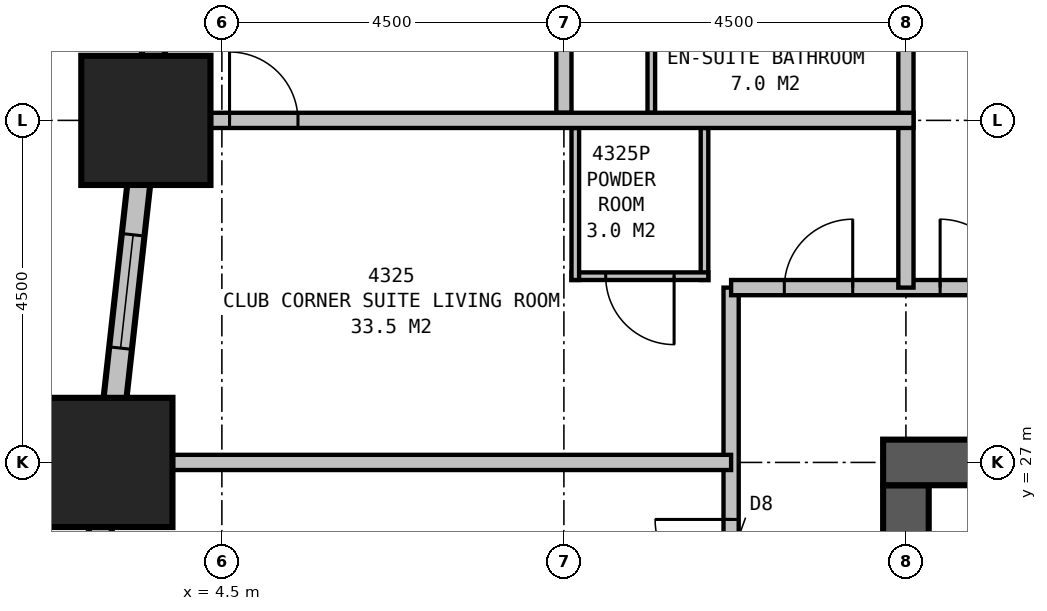
"""IFC4 building model, lengths in metres.
Left out: names, types, materials, properties, quantities, classifications, styles, units other than length and angle.
Written with IfcOpenShell. Run it as: python <this file> out.ifc"""

import sys

from ifc_helpers import new_model, si_unit, direction, frame, frame_2d, origin, origin_2d, place, context, subcontext, project, spatial, rectangle, extrude, element, fill, save


model = new_model("IFC4")
c1 = context("Model", 3, precision=1e-05, world=origin(), true_north=direction((0.0, 1.0)))
c2 = subcontext(c1, "Body", "Model", "MODEL_VIEW")
j1 = project(units=[si_unit("LENGTHUNIT", "METRE"), si_unit("PLANEANGLEUNIT", "RADIAN")], contexts=[c1])
p1 = place(None, origin())
s1 = spatial("IfcSite", under=j1, at=p1, CompositionType="ELEMENT")
p2 = place(p1, origin())
s2 = spatial("IfcBuilding", under=s1, at=p2, CompositionType="ELEMENT")
p3 = place(p2, frame((0.0, 0.0, 169.4)))
s3 = spatial("IfcBuildingStorey", under=s2, at=p3, CompositionType="ELEMENT", Elevation=169.4)
for number, where, z_axis, x_axis in (
    (1, (3.5, 31.5, 0.0), (0.0, 0.0, 1.0), (1.0, 0.0, 0.0)),
    (2, (3.0, 27.0, 0.0), (0.0, 0.0, 1.0), (1.0, 0.0, 0.0)),
):
    element("IfcColumn", number, at=place(p3, frame(where, z_axis=z_axis, x_axis=x_axis)), inside=s3, PredefinedType="COLUMN", context=c2, shape_type="SweptSolid", body=[
        extrude(rectangle(XDim=1.7, YDim=1.7, at=origin_2d()), origin(), (0.0, 0.0, 1.0), 3.5),
    ])
p4 = place(p3, frame((36.3, 27.0, 0.0), z_axis=(0.0, 0.0, 1.0), x_axis=(-1.0, 0.0, 0.0)))
e3 = element("IfcWall", 3, at=p4, inside=s3, PredefinedType="SHEAR", context=c2, shape_type="SweptSolid", body=[
    extrude(rectangle(XDim=23.1, YDim=0.6, at=frame_2d((11.55, 0.0))), origin(), (0.0, 0.0, 1.0), 3.5),
])
p5 = place(p4, frame((17.05, 0.0, 0.0)))
e4 = element("IfcOpeningElement", 4, at=p5, cuts=e3, PredefinedType="OPENING", context=c2, shape_type="SweptSolid", body=[
    extrude(rectangle(XDim=1.0, YDim=2.1, at=frame_2d((0.5, 1.05))), frame((0.0, 0.31, 0.0), z_axis=(0.0, -1.0, 0.0), x_axis=(1.0, 0.0, 0.0)), (0.0, 0.0, 1.0), 0.62),
])
p6 = place(p4, frame((12.05, 0.0, 0.0)))
e5 = element("IfcOpeningElement", 5, at=p6, cuts=e3, PredefinedType="OPENING", context=c2, shape_type="SweptSolid", body=[
    extrude(rectangle(XDim=1.0, YDim=2.1, at=frame_2d((0.5, 1.05))), frame((0.0, 0.31, 0.0), z_axis=(0.0, -1.0, 0.0), x_axis=(1.0, 0.0, 0.0)), (0.0, 0.0, 1.0), 0.62),
])
p7 = place(p4, frame((7.05, 0.0, 0.0)))
e6 = element("IfcOpeningElement", 6, at=p7, cuts=e3, PredefinedType="OPENING", context=c2, shape_type="SweptSolid", body=[
    extrude(rectangle(XDim=1.0, YDim=2.1, at=frame_2d((0.5, 1.05))), frame((0.0, 0.31, 0.0), z_axis=(0.0, -1.0, 0.0), x_axis=(1.0, 0.0, 0.0)), (0.0, 0.0, 1.0), 0.62),
])
p8 = place(p3, frame((13.5, 26.7, 0.0), z_axis=(0.0, 0.0, 1.0), x_axis=(0.0, -1.0, 0.0)))
e7 = element("IfcWall", 7, at=p8, inside=s3, PredefinedType="SHEAR", context=c2, shape_type="SweptSolid", body=[
    extrude(rectangle(XDim=6.7, YDim=0.6, at=frame_2d((3.35, 0.0))), origin(), (0.0, 0.0, 1.0), 3.5),
])
p9 = place(p3, frame((4.017, 36.149, 0.0), z_axis=(0.0, 0.0, 1.0), x_axis=(-0.110433862387, -0.993883475081, 0.0)))
e8 = element("IfcWall", 8, at=p9, inside=s3, PredefinedType="STANDARD", context=c2, shape_type="SweptSolid", body=[
    extrude(rectangle(XDim=22.939, YDim=0.3, at=frame_2d((11.469, 0.0))), origin(), (0.0, 0.0, 1.0), 2.25),
])
p10 = place(p9, frame((1.664, 0.0, 0.5)))
e9 = element("IfcOpeningElement", 9, at=p10, cuts=e8, PredefinedType="OPENING", context=c2, shape_type="SweptSolid", body=[
    extrude(rectangle(XDim=1.5, YDim=1.6, at=frame_2d((0.75, 0.8))), frame((0.0, 0.16, 0.0), z_axis=(0.0, -1.0, 0.0), x_axis=(1.0, 0.0, 0.0)), (0.0, 0.0, 1.0), 0.32),
])
p11 = place(p9, frame((6.192, 0.0, 0.5)))
e10 = element("IfcOpeningElement", 10, at=p11, cuts=e8, PredefinedType="OPENING", context=c2, shape_type="SweptSolid", body=[
    extrude(rectangle(XDim=1.5, YDim=1.6, at=frame_2d((0.75, 0.8))), frame((0.0, 0.16, 0.0), z_axis=(0.0, -1.0, 0.0), x_axis=(1.0, 0.0, 0.0)), (0.0, 0.0, 1.0), 0.32),
])
p12 = place(p9, frame((10.719, 0.0, 0.5)))
e11 = element("IfcOpeningElement", 11, at=p12, cuts=e8, PredefinedType="OPENING", context=c2, shape_type="SweptSolid", body=[
    extrude(rectangle(XDim=1.5, YDim=1.6, at=frame_2d((0.75, 0.8))), frame((0.0, 0.16, 0.0), z_axis=(0.0, -1.0, 0.0), x_axis=(1.0, 0.0, 0.0)), (0.0, 0.0, 1.0), 0.32),
])
p13 = place(p9, frame((15.247, 0.0, 0.5)))
e12 = element("IfcOpeningElement", 12, at=p13, cuts=e8, PredefinedType="OPENING", context=c2, shape_type="SweptSolid", body=[
    extrude(rectangle(XDim=1.5, YDim=1.6, at=frame_2d((0.75, 0.8))), frame((0.0, 0.16, 0.0), z_axis=(0.0, -1.0, 0.0), x_axis=(1.0, 0.0, 0.0)), (0.0, 0.0, 1.0), 0.32),
])
p14 = place(p9, frame((19.775, 0.0, 0.5)))
e13 = element("IfcOpeningElement", 13, at=p14, cuts=e8, PredefinedType="OPENING", context=c2, shape_type="SweptSolid", body=[
    extrude(rectangle(XDim=1.5, YDim=1.6, at=frame_2d((0.75, 0.8))), frame((0.0, 0.16, 0.0), z_axis=(0.0, -1.0, 0.0), x_axis=(1.0, 0.0, 0.0)), (0.0, 0.0, 1.0), 0.32),
])
p15 = place(p3, frame((11.2, 29.3, 0.0), z_axis=(0.0, 0.0, 1.0), x_axis=(1.0, 0.0, 0.0)))
e14 = element("IfcWall", 14, at=p15, inside=s3, PredefinedType="PARTITIONING", context=c2, shape_type="SweptSolid", body=[
    extrude(rectangle(XDim=27.1, YDim=0.2, at=frame_2d((13.55, 0.0))), origin(), (0.0, 0.0, 1.0), 3.25),
])
p16 = place(p15, frame((2.75, 0.0, 0.0)))
e15 = element("IfcOpeningElement", 15, at=p16, cuts=e14, PredefinedType="OPENING", context=c2, shape_type="SweptSolid", body=[
    extrude(rectangle(XDim=0.9, YDim=2.1, at=frame_2d((0.45, 1.05))), frame((0.0, 0.11, 0.0), z_axis=(0.0, -1.0, 0.0), x_axis=(1.0, 0.0, 0.0)), (0.0, 0.0, 1.0), 0.22),
])
p17 = place(p15, frame((9.55, 0.0, 0.0)))
e16 = element("IfcOpeningElement", 16, at=p17, cuts=e14, PredefinedType="OPENING", context=c2, shape_type="SweptSolid", body=[
    extrude(rectangle(XDim=0.9, YDim=2.1, at=frame_2d((0.45, 1.05))), frame((0.0, 0.11, 0.0), z_axis=(0.0, -1.0, 0.0), x_axis=(1.0, 0.0, 0.0)), (0.0, 0.0, 1.0), 0.22),
])
p18 = place(p15, frame((16.25, 0.0, 0.0)))
e17 = element("IfcOpeningElement", 17, at=p18, cuts=e14, PredefinedType="OPENING", context=c2, shape_type="SweptSolid", body=[
    extrude(rectangle(XDim=0.9, YDim=2.1, at=frame_2d((0.45, 1.05))), frame((0.0, 0.11, 0.0), z_axis=(0.0, -1.0, 0.0), x_axis=(1.0, 0.0, 0.0)), (0.0, 0.0, 1.0), 0.22),
])
p19 = place(p15, frame((20.75, 0.0, 0.0)))
e18 = element("IfcOpeningElement", 18, at=p19, cuts=e14, PredefinedType="OPENING", context=c2, shape_type="SweptSolid", body=[
    extrude(rectangle(XDim=0.9, YDim=2.1, at=frame_2d((0.45, 1.05))), frame((0.0, 0.11, 0.0), z_axis=(0.0, -1.0, 0.0), x_axis=(1.0, 0.0, 0.0)), (0.0, 0.0, 1.0), 0.22),
])
p20 = place(p15, frame((25.5, 0.0, 0.0)))
e19 = element("IfcOpeningElement", 19, at=p20, cuts=e14, PredefinedType="OPENING", context=c2, shape_type="SweptSolid", body=[
    extrude(rectangle(XDim=0.9, YDim=2.1, at=frame_2d((0.45, 1.05))), frame((0.0, 0.11, 0.0), z_axis=(0.0, -1.0, 0.0), x_axis=(1.0, 0.0, 0.0)), (0.0, 0.0, 1.0), 0.22),
])
p21 = place(p15, frame((0.7, 0.0, 0.0)))
e20 = element("IfcOpeningElement", 20, at=p21, cuts=e14, PredefinedType="OPENING", context=c2, shape_type="SweptSolid", body=[
    extrude(rectangle(XDim=0.9, YDim=2.1, at=frame_2d((0.45, 1.05))), frame((0.0, 0.11, 0.0), z_axis=(0.0, -1.0, 0.0), x_axis=(1.0, 0.0, 0.0)), (0.0, 0.0, 1.0), 0.22),
])
p22 = place(p3, frame((11.2, 10.6, 0.0), z_axis=(0.0, 0.0, 1.0), x_axis=(0.0, 1.0, 0.0)))
e21 = element("IfcWall", 21, at=p22, inside=s3, PredefinedType="PARTITIONING", context=c2, shape_type="SweptSolid", body=[
    extrude(rectangle(XDim=18.7, YDim=0.2, at=frame_2d((9.35, 0.0))), origin(), (0.0, 0.0, 1.0), 3.25),
])
p23 = place(p22, frame((6.05, 0.0, 0.0)))
e22 = element("IfcOpeningElement", 22, at=p23, cuts=e21, PredefinedType="OPENING", context=c2, shape_type="SweptSolid", body=[
    extrude(rectangle(XDim=0.9, YDim=2.1, at=frame_2d((0.45, 1.05))), frame((0.0, 0.11, 0.0), z_axis=(0.0, -1.0, 0.0), x_axis=(1.0, 0.0, 0.0)), (0.0, 0.0, 1.0), 0.22),
])
p24 = place(p22, frame((10.55, 0.0, 0.0)))
e23 = element("IfcOpeningElement", 23, at=p24, cuts=e21, PredefinedType="OPENING", context=c2, shape_type="SweptSolid", body=[
    extrude(rectangle(XDim=0.9, YDim=2.1, at=frame_2d((0.45, 1.05))), frame((0.0, 0.11, 0.0), z_axis=(0.0, -1.0, 0.0), x_axis=(1.0, 0.0, 0.0)), (0.0, 0.0, 1.0), 0.22),
])
p25 = place(p22, frame((14.65, 0.0, 0.0)))
e24 = element("IfcOpeningElement", 24, at=p25, cuts=e21, PredefinedType="OPENING", context=c2, shape_type="SweptSolid", body=[
    extrude(rectangle(XDim=1.0, YDim=2.1, at=frame_2d((0.5, 1.05))), frame((0.0, 0.11, 0.0), z_axis=(0.0, -1.0, 0.0), x_axis=(1.0, 0.0, 0.0)), (0.0, 0.0, 1.0), 0.22),
])
p26 = place(p3, frame((11.2, 27.0, 0.0), z_axis=(0.0, 0.0, 1.0), x_axis=(-1.0, 0.0, 0.0)))
e25 = element("IfcWall", 25, at=p26, inside=s3, PredefinedType="PARTITIONING", context=c2, shape_type="SweptSolid", body=[
    extrude(rectangle(XDim=7.977, YDim=0.2, at=frame_2d((3.988, 0.0))), origin(), (0.0, 0.0, 1.0), 1.95),
])
p27 = place(p3, frame((13.5, 29.3, 0.0), z_axis=(0.0, 0.0, 1.0), x_axis=(0.0, 1.0, 0.0)))
e26 = element("IfcWall", 26, at=p27, inside=s3, PredefinedType="PARTITIONING", context=c2, shape_type="SweptSolid", body=[
    extrude(rectangle(XDim=11.2, YDim=0.2, at=frame_2d((5.6, 0.0))), origin(), (0.0, 0.0, 1.0), 2.25),
])
p28 = place(p3, frame((13.6, 31.5, 0.0), z_axis=(0.0, 0.0, 1.0), x_axis=(-1.0, 0.0, 0.0)))
e27 = element("IfcWall", 27, at=p28, inside=s3, PredefinedType="PARTITIONING", context=c2, shape_type="SweptSolid", body=[
    extrude(rectangle(XDim=10.099, YDim=0.2, at=frame_2d((5.05, 0.0))), origin(), (0.0, 0.0, 1.0), 3.25),
])
p29 = place(p28, frame((8.999, 0.0, 0.0), z_axis=(0.0, 0.0, 1.0), x_axis=(-1.0, 0.0, 0.0)))
e28 = element("IfcOpeningElement", 28, at=p29, cuts=e27, PredefinedType="OPENING", context=c2, shape_type="SweptSolid", body=[
    extrude(rectangle(XDim=0.9, YDim=2.1, at=frame_2d((0.45, 1.05))), frame((0.0, 0.11, 0.0), z_axis=(0.0, -1.0, 0.0), x_axis=(1.0, 0.0, 0.0)), (0.0, 0.0, 1.0), 0.22),
])
p30 = place(p3, frame((9.15, 31.4, 0.0), z_axis=(0.0, 0.0, 1.0), x_axis=(0.0, -1.0, 0.0)))
e29 = element("IfcWall", 29, at=p30, inside=s3, PredefinedType="PLUMBINGWALL", context=c2, shape_type="SweptSolid", body=[
    extrude(rectangle(XDim=2.0, YDim=0.1, at=frame_2d((1.0, 0.0))), origin(), (0.0, 0.0, 1.0), 2.25),
])
p31 = place(p3, frame((10.85, 31.4, 0.0), z_axis=(0.0, 0.0, 1.0), x_axis=(0.0, -1.0, 0.0)))
e30 = element("IfcWall", 30, at=p31, inside=s3, PredefinedType="PLUMBINGWALL", context=c2, shape_type="SweptSolid", body=[
    extrude(rectangle(XDim=2.0, YDim=0.1, at=frame_2d((1.0, 0.0))), origin(), (0.0, 0.0, 1.0), 3.25),
])
p32 = place(p3, frame((10.9, 29.45, 0.0), z_axis=(0.0, 0.0, 1.0), x_axis=(-1.0, 0.0, 0.0)))
e31 = element("IfcWall", 31, at=p32, inside=s3, PredefinedType="PLUMBINGWALL", context=c2, shape_type="SweptSolid", body=[
    extrude(rectangle(XDim=1.8, YDim=0.1, at=frame_2d((0.9, 0.0))), origin(), (0.0, 0.0, 1.0), 3.25),
])
p33 = place(p32, frame((0.45, 0.0, 0.0)))
e32 = element("IfcOpeningElement", 32, at=p33, cuts=e31, PredefinedType="OPENING", context=c2, shape_type="SweptSolid", body=[
    extrude(rectangle(XDim=0.9, YDim=2.1, at=frame_2d((0.45, 1.05))), frame((0.0, 0.06, 0.0), z_axis=(0.0, -1.0, 0.0), x_axis=(1.0, 0.0, 0.0)), (0.0, 0.0, 1.0), 0.12),
])
p34 = place(p3, frame((9.0, 31.6, 0.0), z_axis=(0.0, 0.0, 1.0), x_axis=(0.0, 1.0, 0.0)))
e33 = element("IfcWall", 33, at=p34, inside=s3, PredefinedType="PARTITIONING", context=c2, shape_type="SweptSolid", body=[
    extrude(rectangle(XDim=4.4, YDim=0.2, at=frame_2d((2.2, 0.0))), origin(), (0.0, 0.0, 1.0), 2.25),
])
p35 = place(p34, frame((2.5, 0.0, 0.0)))
e34 = element("IfcOpeningElement", 34, at=p35, cuts=e33, PredefinedType="OPENING", context=c2, shape_type="SweptSolid", body=[
    extrude(rectangle(XDim=0.9, YDim=2.1, at=frame_2d((0.45, 1.05))), frame((0.0, 0.11, 0.0), z_axis=(0.0, -1.0, 0.0), x_axis=(1.0, 0.0, 0.0)), (0.0, 0.0, 1.0), 0.22),
])
p36 = place(p3, frame((10.15, 31.6, 0.0), z_axis=(0.0, 0.0, 1.0), x_axis=(0.0, 1.0, 0.0)))
e35 = element("IfcWall", 35, at=p36, inside=s3, PredefinedType="PLUMBINGWALL", context=c2, shape_type="SweptSolid", body=[
    extrude(rectangle(XDim=2.3, YDim=0.1, at=frame_2d((1.15, 0.0))), origin(), (0.0, 0.0, 1.0), 3.25),
])
p37 = place(p11, origin())
e36 = element("IfcWindow", 36, at=p37, inside=s3, PartitioningType="SINGLE_PANEL", PredefinedType="WINDOW", context=c2, shape_type="SweptSolid", body=[
    extrude(rectangle(XDim=1.5, YDim=1.6, at=frame_2d((0.75, 0.8))), frame((0.0, 0.03, 0.0), z_axis=(0.0, -1.0, 0.0), x_axis=(1.0, 0.0, 0.0)), (0.0, 0.0, 1.0), 0.06),
])
fill(e10, e36)
p38 = place(p16, origin())
e37 = element("IfcDoor", 37, at=p38, inside=s3, OperationType="SINGLE_SWING_LEFT", PredefinedType="DOOR", context=c2, shape_type="SweptSolid", body=[
    extrude(rectangle(XDim=0.9, YDim=2.1, at=frame_2d((0.45, 1.05))), frame((0.0, 0.025, 0.0), z_axis=(0.0, -1.0, 0.0), x_axis=(1.0, 0.0, 0.0)), (0.0, 0.0, 1.0), 0.05),
])
fill(e15, e37)
p39 = place(p21, origin())
e38 = element("IfcDoor", 38, at=p39, inside=s3, OperationType="SINGLE_SWING_RIGHT", PredefinedType="DOOR", context=c2, shape_type="SweptSolid", body=[
    extrude(rectangle(XDim=0.9, YDim=2.1, at=frame_2d((0.45, 1.05))), frame((0.0, 0.025, 0.0), z_axis=(0.0, -1.0, 0.0), x_axis=(1.0, 0.0, 0.0)), (0.0, 0.0, 1.0), 0.05),
])
fill(e20, e38)
p40 = place(p25, origin())
e39 = element("IfcDoor", 39, at=p40, inside=s3, OperationType="SINGLE_SWING_RIGHT", PredefinedType="DOOR", context=c2, shape_type="SweptSolid", body=[
    extrude(rectangle(XDim=1.0, YDim=2.1, at=frame_2d((0.5, 1.05))), frame((0.0, 0.025, 0.0), z_axis=(0.0, -1.0, 0.0), x_axis=(1.0, 0.0, 0.0)), (0.0, 0.0, 1.0), 0.05),
])
fill(e24, e39)
p41 = place(p29, origin())
e40 = element("IfcDoor", 40, at=p41, inside=s3, OperationType="SINGLE_SWING_LEFT", PredefinedType="DOOR", context=c2, shape_type="SweptSolid", body=[
    extrude(rectangle(XDim=0.9, YDim=2.1, at=frame_2d((0.45, 1.05))), frame((0.0, 0.025, 0.0), z_axis=(0.0, -1.0, 0.0), x_axis=(1.0, 0.0, 0.0)), (0.0, 0.0, 1.0), 0.05),
])
fill(e28, e40)
p42 = place(p33, origin())
e41 = element("IfcDoor", 41, at=p42, inside=s3, OperationType="SINGLE_SWING_LEFT", PredefinedType="DOOR", context=c2, shape_type="SweptSolid", body=[
    extrude(rectangle(XDim=0.9, YDim=2.1, at=frame_2d((0.45, 1.05))), frame((0.0, 0.025, 0.0), z_axis=(0.0, -1.0, 0.0), x_axis=(1.0, 0.0, 0.0)), (0.0, 0.0, 1.0), 0.05),
])
fill(e32, e41)
save(model, sys.argv[1])
